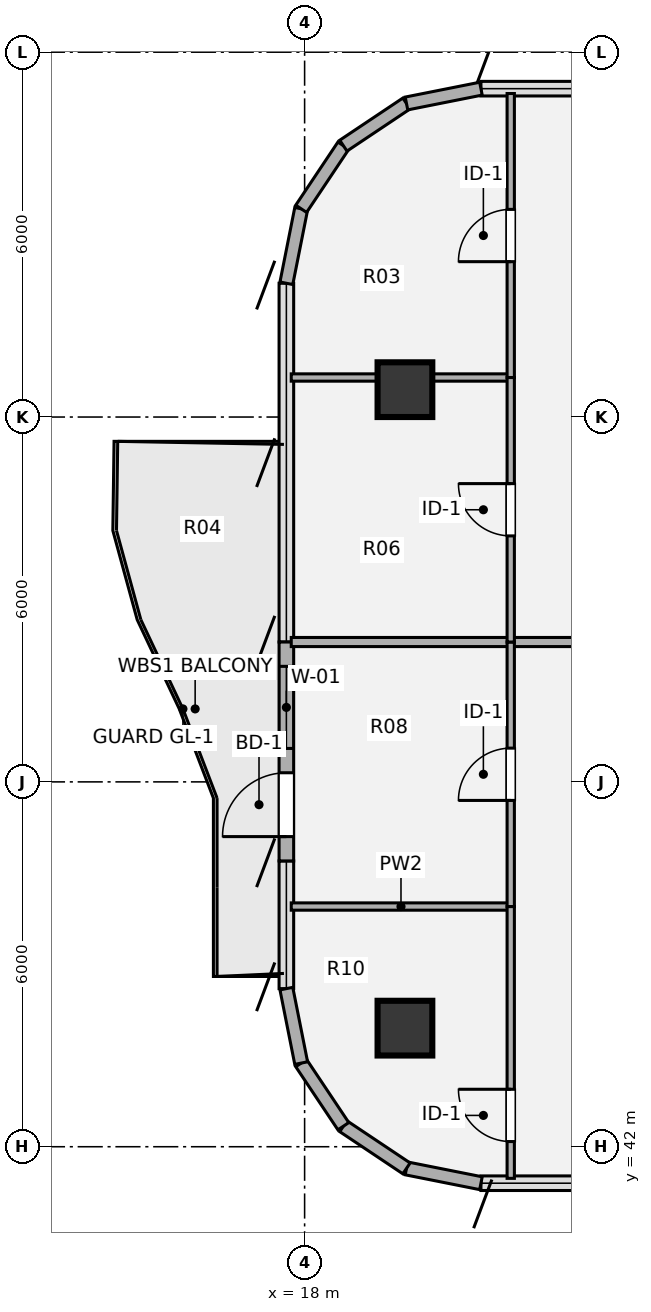
"""IFC4 building model, lengths in metres.
Left out: names, types, materials, properties, quantities, classifications, styles, units other than length and angle.
Written with IfcOpenShell. Run it as: python <this file> out.ifc"""

import sys

from ifc_helpers import new_model, si_unit, direction, frame, frame_2d, origin, origin_2d, place, context, subcontext, project, spatial, rectangle, hollow_circle, extrude, source, transform, mapped, element, fill, save


model = new_model("IFC4")
c1 = context("Model", 3, precision=1e-05, world=origin(), true_north=direction((0.0, 1.0)))
c2 = subcontext(c1, "Body", "Model", "MODEL_VIEW")
j1 = project(units=[si_unit("LENGTHUNIT", "METRE"), si_unit("PLANEANGLEUNIT", "RADIAN")], contexts=[c1])
p1 = place(None, origin())
s1 = spatial("IfcSite", under=j1, at=p1, CompositionType="ELEMENT")
p2 = place(p1, origin())
s2 = spatial("IfcBuilding", under=s1, at=p2, CompositionType="ELEMENT")
p3 = place(p2, frame((0.0, 0.0, 283.5)))
s3 = spatial("IfcBuildingStorey", under=s2, at=p3, CompositionType="ELEMENT", Elevation=283.5)
m1 = source(origin(), c2, "Body", "SweptSolid", [
    extrude(hollow_circle(Radius=0.45, WallThickness=0.032, at=origin_2d()), origin(), (0.0, 0.0, 1.0), 3.78),
])
for number, where, z_axis, x_axis in (
    (1, (19.65, 43.95, 0.0), (0.0, 0.0, 1.0), (1.0, 0.0, 0.0)),
    (2, (19.65, 54.45, 0.0), (0.0, 0.0, 1.0), (1.0, 0.0, 0.0)),
):
    element("IfcColumn", number, at=place(p3, frame(where, z_axis=z_axis, x_axis=x_axis)), inside=s3, PredefinedType="COLUMN", context=c2, shape_type="MappedRepresentation", body=[
        mapped(m1, transform((0.0, 0.0, 0.0), x_axis=(1.0, 0.0, 0.0), y_axis=(0.0, 1.0, 0.0), z_axis=(0.0, 0.0, 1.0), scale=1.0)),
    ])
for number, where, z_axis, x_axis in (
    (3, (20.9, 41.4, 0.0), (0.0, 0.0, 1.0), (-0.981, 0.195, 0.0)),
    (4, (19.675, 41.644, 0.0), (0.0, 0.0, 1.0), (-0.831, 0.556, 0.0)),
    (5, (18.637, 42.337, 0.0), (0.0, 0.0, 1.0), (-0.556, 0.831, 0.0)),
    (6, (17.944, 43.375, 0.0), (0.0, 0.0, 1.0), (-0.195, 0.981, 0.0)),
):
    element("IfcWall", number, at=place(p3, frame(where, z_axis=z_axis, x_axis=x_axis)), inside=s3, PredefinedType="SOLIDWALL", context=c2, shape_type="SweptSolid", body=[
        extrude(rectangle(XDim=1.249, YDim=0.215, at=frame_2d((0.624, 0.0))), origin(), (0.0, 0.0, 1.0), 3.53),
    ])
p4 = place(p3, frame((17.7, 46.7, 0.0), z_axis=(0.0, 0.0, 1.0), x_axis=(0.0, 1.0, 0.0)))
e7 = element("IfcWall", 7, at=p4, inside=s3, PredefinedType="SOLIDWALL", context=c2, shape_type="SweptSolid", body=[
    extrude(rectangle(XDim=3.6, YDim=0.24, at=frame_2d((1.8, 0.0))), origin(), (0.0, 0.0, 1.0), 3.53),
])
p5 = place(p4, frame((0.4, 0.0, 0.0)))
e8 = element("IfcOpeningElement", 8, at=p5, cuts=e7, PredefinedType="OPENING", context=c2, shape_type="SweptSolid", body=[
    extrude(rectangle(XDim=1.05, YDim=2.15, at=origin_2d()), frame((0.525, 0.13, 1.075), z_axis=(0.0, -1.0, 0.0), x_axis=(1.0, 0.0, 0.0)), (0.0, 0.0, 1.0), 0.26),
])
p6 = place(p4, frame((1.85, 0.0, 0.85)))
e9 = element("IfcOpeningElement", 9, at=p6, cuts=e7, PredefinedType="OPENING", context=c2, shape_type="SweptSolid", body=[
    extrude(rectangle(XDim=1.35, YDim=1.35, at=origin_2d()), frame((0.675, 0.13, 0.675), z_axis=(0.0, -1.0, 0.0), x_axis=(1.0, 0.0, 0.0)), (0.0, 0.0, 1.0), 0.26),
])
for number, where, z_axis, x_axis in (
    (10, (17.7, 56.2, 0.0), (0.0, 0.0, 1.0), (0.195, 0.981, 0.0)),
    (11, (17.944, 57.425, 0.0), (0.0, 0.0, 1.0), (0.556, 0.831, 0.0)),
    (12, (18.637, 58.463, 0.0), (0.0, 0.0, 1.0), (0.831, 0.556, 0.0)),
    (13, (19.675, 59.156, 0.0), (0.0, 0.0, 1.0), (0.981, 0.195, 0.0)),
):
    element("IfcWall", number, at=place(p3, frame(where, z_axis=z_axis, x_axis=x_axis)), inside=s3, PredefinedType="SOLIDWALL", context=c2, shape_type="SweptSolid", body=[
        extrude(rectangle(XDim=1.249, YDim=0.215, at=frame_2d((0.624, 0.0))), origin(), (0.0, 0.0, 1.0), 3.53),
    ])
p7 = place(p3, frame((17.78, 45.95, 0.0), z_axis=(0.0, 0.0, 1.0), x_axis=(1.0, 0.0, 0.0)))
e14 = element("IfcWall", 14, at=p7, inside=s3, PredefinedType="PARTITIONING", context=c2, shape_type="SweptSolid", body=[
    extrude(rectangle(XDim=3.61, YDim=0.12, at=frame_2d((1.805, 0.0))), origin(), (0.0, 0.0, 1.0), 2.982),
])
p8 = place(p3, frame((17.78, 50.3, 0.0), z_axis=(0.0, 0.0, 1.0), x_axis=(1.0, 0.0, 0.0)))
e15 = element("IfcWall", 15, at=p8, inside=s3, PredefinedType="PARTITIONING", context=c2, shape_type="SweptSolid", body=[
    extrude(rectangle(XDim=17.32, YDim=0.15, at=frame_2d((8.66, 0.0))), origin(), (0.0, 0.0, 1.0), 2.982),
])
p9 = place(p3, frame((17.78, 54.65, 0.0), z_axis=(0.0, 0.0, 1.0), x_axis=(1.0, 0.0, 0.0)))
e16 = element("IfcWall", 16, at=p9, inside=s3, PredefinedType="PARTITIONING", context=c2, shape_type="SweptSolid", body=[
    extrude(rectangle(XDim=3.61, YDim=0.12, at=frame_2d((1.805, 0.0))), origin(), (0.0, 0.0, 1.0), 2.903),
])
p10 = place(p3, frame((21.39, 41.48, 0.0), z_axis=(0.0, 0.0, 1.0), x_axis=(0.0, 1.0, 0.0)))
e17 = element("IfcWall", 17, at=p10, inside=s3, PredefinedType="PARTITIONING", context=c2, shape_type="SweptSolid", body=[
    extrude(rectangle(XDim=4.47, YDim=0.12, at=frame_2d((2.235, 0.0))), origin(), (0.0, 0.0, 1.0), 3.5),
])
p11 = place(p10, frame((0.605, 0.0, 0.0)))
e18 = element("IfcOpeningElement", 18, at=p11, cuts=e17, PredefinedType="OPENING", context=c2, shape_type="SweptSolid", body=[
    extrude(rectangle(XDim=0.86, YDim=2.1, at=origin_2d()), frame((0.43, 0.07, 1.05), z_axis=(0.0, -1.0, 0.0), x_axis=(1.0, 0.0, 0.0)), (0.0, 0.0, 1.0), 0.14),
])
p12 = place(p3, frame((21.39, 45.95, 0.0), z_axis=(0.0, 0.0, 1.0), x_axis=(0.0, 1.0, 0.0)))
e19 = element("IfcWall", 19, at=p12, inside=s3, PredefinedType="PARTITIONING", context=c2, shape_type="SweptSolid", body=[
    extrude(rectangle(XDim=4.35, YDim=0.12, at=frame_2d((2.175, 0.0))), origin(), (0.0, 0.0, 1.0), 3.5),
])
p13 = place(p12, frame((1.745, 0.0, 0.0)))
e20 = element("IfcOpeningElement", 20, at=p13, cuts=e19, PredefinedType="OPENING", context=c2, shape_type="SweptSolid", body=[
    extrude(rectangle(XDim=0.86, YDim=2.1, at=origin_2d()), frame((0.43, 0.07, 1.05), z_axis=(0.0, -1.0, 0.0), x_axis=(1.0, 0.0, 0.0)), (0.0, 0.0, 1.0), 0.14),
])
p14 = place(p3, frame((21.39, 50.3, 0.0), z_axis=(0.0, 0.0, 1.0), x_axis=(0.0, 1.0, 0.0)))
e21 = element("IfcWall", 21, at=p14, inside=s3, PredefinedType="PARTITIONING", context=c2, shape_type="SweptSolid", body=[
    extrude(rectangle(XDim=4.35, YDim=0.12, at=frame_2d((2.175, 0.0))), origin(), (0.0, 0.0, 1.0), 3.5),
])
p15 = place(p14, frame((1.745, 0.0, 0.0)))
e22 = element("IfcOpeningElement", 22, at=p15, cuts=e21, PredefinedType="OPENING", context=c2, shape_type="SweptSolid", body=[
    extrude(rectangle(XDim=0.86, YDim=2.1, at=origin_2d()), frame((0.43, 0.07, 1.05), z_axis=(0.0, -1.0, 0.0), x_axis=(1.0, 0.0, 0.0)), (0.0, 0.0, 1.0), 0.14),
])
p16 = place(p3, frame((21.39, 54.65, 0.0), z_axis=(0.0, 0.0, 1.0), x_axis=(0.0, 1.0, 0.0)))
e23 = element("IfcWall", 23, at=p16, inside=s3, PredefinedType="PARTITIONING", context=c2, shape_type="SweptSolid", body=[
    extrude(rectangle(XDim=4.67, YDim=0.12, at=frame_2d((2.335, 0.0))), origin(), (0.0, 0.0, 1.0), 3.5),
])
p17 = place(p16, frame((1.905, 0.0, 0.0)))
e24 = element("IfcOpeningElement", 24, at=p17, cuts=e23, PredefinedType="OPENING", context=c2, shape_type="SweptSolid", body=[
    extrude(rectangle(XDim=0.86, YDim=2.1, at=origin_2d()), frame((0.43, 0.07, 1.05), z_axis=(0.0, -1.0, 0.0), x_axis=(1.0, 0.0, 0.0)), (0.0, 0.0, 1.0), 0.14),
])
m2 = source(origin(), c2, "Body", "SweptSolid", [
    extrude(rectangle(XDim=1.05, YDim=2.15, at=origin_2d()), frame((0.525, 0.025, 1.075), z_axis=(0.0, -1.0, 0.0), x_axis=(1.0, 0.0, 0.0)), (0.0, 0.0, 1.0), 0.05),
])
p18 = place(p5, origin())
e25 = element("IfcDoor", 25, at=p18, inside=s3, OperationType="SINGLE_SWING_LEFT", PredefinedType="DOOR", context=c2, shape_type="MappedRepresentation", body=[
    mapped(m2, transform((0.0, 0.0, 0.0), x_axis=(1.0, 0.0, 0.0), y_axis=(0.0, 1.0, 0.0), z_axis=(0.0, 0.0, 1.0), scale=1.0)),
])
fill(e8, e25)
m3 = source(origin(), c2, "Body", "SweptSolid", [
    extrude(rectangle(XDim=1.35, YDim=1.35, at=origin_2d()), frame((0.675, 0.03, 0.675), z_axis=(0.0, -1.0, 0.0), x_axis=(1.0, 0.0, 0.0)), (0.0, 0.0, 1.0), 0.06),
])
p19 = place(p6, origin())
e26 = element("IfcWindow", 26, at=p19, inside=s3, PartitioningType="SINGLE_PANEL", PredefinedType="WINDOW", context=c2, shape_type="MappedRepresentation", body=[
    mapped(m3, transform((0.0, 0.0, 0.0), x_axis=(1.0, 0.0, 0.0), y_axis=(0.0, 1.0, 0.0), z_axis=(0.0, 0.0, 1.0), scale=1.0)),
])
fill(e9, e26)
m4 = source(origin(), c2, "Body", "SweptSolid", [
    extrude(rectangle(XDim=0.86, YDim=2.1, at=origin_2d()), frame((0.43, 0.025, 1.05), z_axis=(0.0, -1.0, 0.0), x_axis=(1.0, 0.0, 0.0)), (0.0, 0.0, 1.0), 0.05),
])
p20 = place(p11, origin())
e27 = element("IfcDoor", 27, at=p20, inside=s3, OperationType="SINGLE_SWING_RIGHT", PredefinedType="DOOR", context=c2, shape_type="MappedRepresentation", body=[
    mapped(m4, transform((0.0, 0.0, 0.0), x_axis=(1.0, 0.0, 0.0), y_axis=(0.0, 1.0, 0.0), z_axis=(0.0, 0.0, 1.0), scale=1.0)),
])
fill(e18, e27)
p21 = place(p13, origin())
e28 = element("IfcDoor", 28, at=p21, inside=s3, OperationType="SINGLE_SWING_LEFT", PredefinedType="DOOR", context=c2, shape_type="MappedRepresentation", body=[
    mapped(m4, transform((0.0, 0.0, 0.0), x_axis=(1.0, 0.0, 0.0), y_axis=(0.0, 1.0, 0.0), z_axis=(0.0, 0.0, 1.0), scale=1.0)),
])
fill(e20, e28)
p22 = place(p15, origin())
e29 = element("IfcDoor", 29, at=p22, inside=s3, OperationType="SINGLE_SWING_RIGHT", PredefinedType="DOOR", context=c2, shape_type="MappedRepresentation", body=[
    mapped(m4, transform((0.0, 0.0, 0.0), x_axis=(1.0, 0.0, 0.0), y_axis=(0.0, 1.0, 0.0), z_axis=(0.0, 0.0, 1.0), scale=1.0)),
])
fill(e22, e29)
p23 = place(p17, origin())
e30 = element("IfcDoor", 30, at=p23, inside=s3, OperationType="SINGLE_SWING_LEFT", PredefinedType="DOOR", context=c2, shape_type="MappedRepresentation", body=[
    mapped(m4, transform((0.0, 0.0, 0.0), x_axis=(1.0, 0.0, 0.0), y_axis=(0.0, 1.0, 0.0), z_axis=(0.0, 0.0, 1.0), scale=1.0)),
])
fill(e24, e30)
save(model, sys.argv[1])
